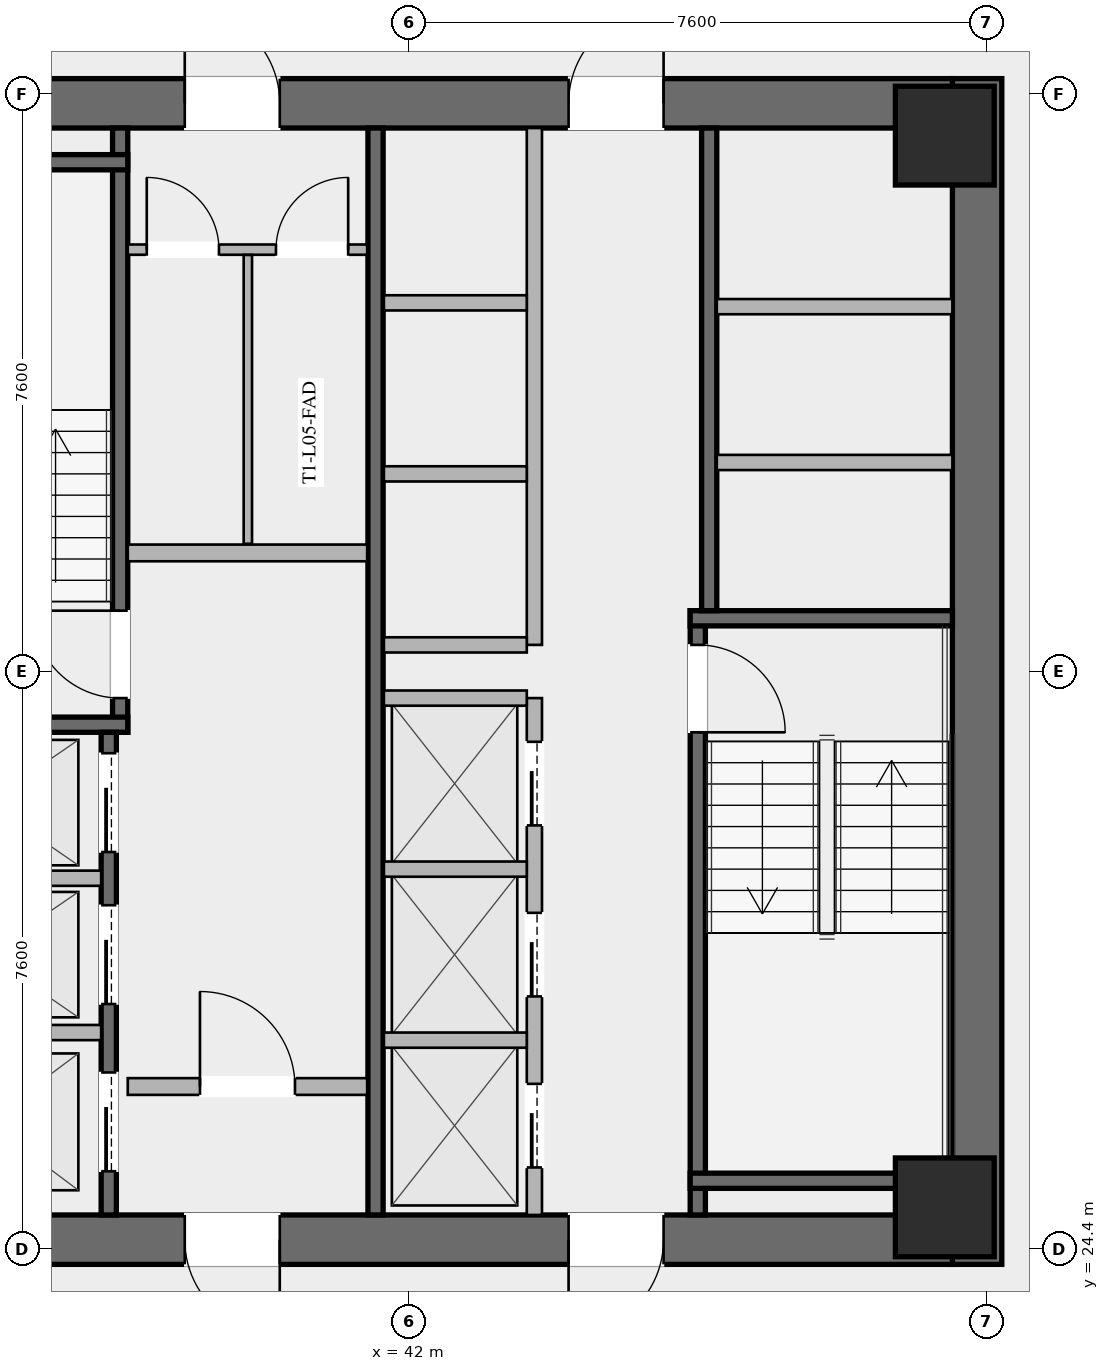
"""IFC4 building model, lengths in metres.
Left out: names, types, materials, properties, quantities, classifications, styles, units other than length and angle.
Written with IfcOpenShell. Run it as: python <this file> out.ifc"""

import sys

from ifc_helpers import new_model, si_unit, direction, frame, frame_2d, origin, origin_2d, place, context, subcontext, project, spatial, rectangle, hollow_rectangle, extrude, element, fill, save


model = new_model("IFC4")
c1 = context("Model", 3, precision=1e-05, world=origin(), true_north=direction((0.0, 1.0)))
c2 = subcontext(c1, "Body", "Model", "MODEL_VIEW")
j1 = project(units=[si_unit("LENGTHUNIT", "METRE"), si_unit("PLANEANGLEUNIT", "RADIAN")], contexts=[c1])
p1 = place(None, origin())
s1 = spatial("IfcSite", under=j1, at=p1, CompositionType="ELEMENT")
p2 = place(p1, origin())
s2 = spatial("IfcBuilding", under=s1, at=p2, CompositionType="ELEMENT")
p3 = place(p2, frame((0.0, 0.0, 24.6)))
s3 = spatial("IfcBuildingStorey", under=s2, at=p3, CompositionType="ELEMENT", Elevation=24.6)
p4 = place(p3, frame((49.475, 39.8, 0.0), z_axis=(0.0, 0.0, 1.0), x_axis=(0.0, -1.0, 0.0)))
e1 = element("IfcWall", 1, at=p4, inside=s3, PredefinedType="SHEAR", context=c2, shape_type="SweptSolid", body=[
    extrude(rectangle(XDim=15.6, YDim=0.65, at=frame_2d((7.8, 0.0))), origin(), (0.0, 0.0, 1.0), 3.55),
])
p5 = place(p3, frame((49.15, 24.525, 0.0), z_axis=(0.0, 0.0, 1.0), x_axis=(-1.0, 0.0, 0.0)))
e2 = element("IfcWall", 2, at=p5, inside=s3, PredefinedType="SHEAR", context=c2, shape_type="SweptSolid", body=[
    extrude(rectangle(XDim=14.3, YDim=0.65, at=frame_2d((7.15, 0.0))), origin(), (0.0, 0.0, 1.0), 3.55),
])
p6 = place(p5, frame((8.85, 0.0, 0.0)))
e3 = element("IfcOpeningElement", 3, at=p6, cuts=e2, PredefinedType="OPENING", context=c2, shape_type="SweptSolid", body=[
    extrude(rectangle(XDim=1.25, YDim=2.25, at=frame_2d((0.625, 1.125))), frame((0.0, 0.335, 0.0), z_axis=(0.0, -1.0, 0.0), x_axis=(1.0, 0.0, 0.0)), (0.0, 0.0, 1.0), 0.67),
])
p7 = place(p5, frame((3.8, 0.0, 0.0)))
e4 = element("IfcOpeningElement", 4, at=p7, cuts=e2, PredefinedType="OPENING", context=c2, shape_type="SweptSolid", body=[
    extrude(rectangle(XDim=1.25, YDim=2.25, at=frame_2d((0.625, 1.125))), frame((0.0, 0.335, 0.0), z_axis=(0.0, -1.0, 0.0), x_axis=(1.0, 0.0, 0.0)), (0.0, 0.0, 1.0), 0.67),
])
p8 = place(p3, frame((34.85, 39.475, 0.0), z_axis=(0.0, 0.0, 1.0), x_axis=(1.0, 0.0, 0.0)))
e5 = element("IfcWall", 5, at=p8, inside=s3, PredefinedType="SHEAR", context=c2, shape_type="SweptSolid", body=[
    extrude(rectangle(XDim=14.3, YDim=0.65, at=frame_2d((7.15, 0.0))), origin(), (0.0, 0.0, 1.0), 3.55),
])
p9 = place(p8, frame((4.2, 0.0, 0.0)))
e6 = element("IfcOpeningElement", 6, at=p9, cuts=e5, PredefinedType="OPENING", context=c2, shape_type="SweptSolid", body=[
    extrude(rectangle(XDim=1.25, YDim=2.25, at=frame_2d((0.625, 1.125))), frame((0.0, 0.335, 0.0), z_axis=(0.0, -1.0, 0.0), x_axis=(1.0, 0.0, 0.0)), (0.0, 0.0, 1.0), 0.67),
])
p10 = place(p8, frame((9.25, 0.0, 0.0)))
e7 = element("IfcOpeningElement", 7, at=p10, cuts=e5, PredefinedType="OPENING", context=c2, shape_type="SweptSolid", body=[
    extrude(rectangle(XDim=1.25, YDim=2.25, at=frame_2d((0.625, 1.125))), frame((0.0, 0.335, 0.0), z_axis=(0.0, -1.0, 0.0), x_axis=(1.0, 0.0, 0.0)), (0.0, 0.0, 1.0), 0.67),
])
for number, where, z_axis, x_axis in (
    (8, (49.05, 24.95, 0.0), (0.0, 0.0, 1.0), (1.0, 0.0, 0.0)),
    (9, (49.05, 39.05, 0.0), (0.0, 0.0, 1.0), (1.0, 0.0, 0.0)),
):
    element("IfcColumn", number, at=place(p3, frame(where, z_axis=z_axis, x_axis=x_axis)), inside=s3, PredefinedType="COLUMN", context=c2, shape_type="SweptSolid", body=[
        extrude(hollow_rectangle(XDim=1.3, YDim=1.3, WallThickness=0.05, at=origin_2d()), origin(), (0.0, 0.0, 1.0), 3.35),
    ])
p11 = place(p3, frame((38.2, 31.2, 0.0), z_axis=(0.0, 0.0, 1.0), x_axis=(0.0, 1.0, 0.0)))
e10 = element("IfcWall", 10, at=p11, inside=s3, PredefinedType="SHEAR", context=c2, shape_type="SweptSolid", body=[
    extrude(rectangle(XDim=7.95, YDim=0.2, at=frame_2d((3.975, 0.0))), origin(), (0.0, 0.0, 1.0), 3.35),
])
p12 = place(p11, frame((0.45, 0.0, 0.0)))
e11 = element("IfcOpeningElement", 11, at=p12, cuts=e10, PredefinedType="OPENING", context=c2, shape_type="SweptSolid", body=[
    extrude(rectangle(XDim=1.15, YDim=2.2, at=frame_2d((0.575, 1.1))), frame((0.0, 0.11, 0.0), z_axis=(0.0, -1.0, 0.0), x_axis=(1.0, 0.0, 0.0)), (0.0, 0.0, 1.0), 0.22),
])
for number, where, z_axis, x_axis in (
    (12, (34.85, 31.3, 0.0), (0.0, 0.0, 1.0), (1.0, 0.0, 0.0)),
    (13, (34.85, 38.7, 0.0), (0.0, 0.0, 1.0), (1.0, 0.0, 0.0)),
):
    element("IfcWall", number, at=place(p3, frame(where, z_axis=z_axis, x_axis=x_axis)), inside=s3, PredefinedType="SHEAR", context=c2, shape_type="SweptSolid", body=[
        extrude(rectangle(XDim=3.45, YDim=0.2, at=frame_2d((1.725, 0.0))), origin(), (0.0, 0.0, 1.0), 3.35),
    ])
p13 = place(p3, frame((45.8, 32.8, 0.0), z_axis=(0.0, 0.0, 1.0), x_axis=(0.0, -1.0, 0.0)))
e14 = element("IfcWall", 14, at=p13, inside=s3, PredefinedType="SHEAR", context=c2, shape_type="SweptSolid", body=[
    extrude(rectangle(XDim=7.95, YDim=0.2, at=frame_2d((3.975, 0.0))), origin(), (0.0, 0.0, 1.0), 3.35),
])
p14 = place(p13, frame((0.45, 0.0, 0.0)))
e15 = element("IfcOpeningElement", 15, at=p14, cuts=e14, PredefinedType="OPENING", context=c2, shape_type="SweptSolid", body=[
    extrude(rectangle(XDim=1.15, YDim=2.2, at=frame_2d((0.575, 1.1))), frame((0.0, 0.11, 0.0), z_axis=(0.0, -1.0, 0.0), x_axis=(1.0, 0.0, 0.0)), (0.0, 0.0, 1.0), 0.22),
])
for number, where, z_axis, x_axis in (
    (16, (45.7, 32.7, 0.0), (0.0, 0.0, 1.0), (1.0, 0.0, 0.0)),
    (17, (45.7, 25.3, 0.0), (0.0, 0.0, 1.0), (1.0, 0.0, 0.0)),
):
    element("IfcWall", number, at=place(p3, frame(where, z_axis=z_axis, x_axis=x_axis)), inside=s3, PredefinedType="SHEAR", context=c2, shape_type="SweptSolid", body=[
        extrude(rectangle(XDim=3.45, YDim=0.2, at=frame_2d((1.725, 0.0))), origin(), (0.0, 0.0, 1.0), 3.35),
    ])
p15 = place(p3, frame((41.56, 24.85, 0.0), z_axis=(0.0, 0.0, 1.0), x_axis=(0.0, 1.0, 0.0)))
e18 = element("IfcWall", 18, at=p15, inside=s3, PredefinedType="SHEAR", context=c2, shape_type="SweptSolid", body=[
    extrude(rectangle(XDim=14.3, YDim=0.2, at=frame_2d((7.15, 0.0))), origin(), (0.0, 0.0, 1.0), 3.35),
])
p16 = place(p3, frame((38.3, 33.56, 0.0), z_axis=(0.0, 0.0, 1.0), x_axis=(1.0, 0.0, 0.0)))
e19 = element("IfcWall", 19, at=p16, inside=s3, PredefinedType="SOLIDWALL", context=c2, shape_type="SweptSolid", body=[
    extrude(rectangle(XDim=3.15, YDim=0.22, at=frame_2d((1.575, 0.0))), origin(), (0.0, 0.0, 1.0), 2.703),
])
p17 = place(p3, frame((38.3, 26.54, 0.0), z_axis=(0.0, 0.0, 1.0), x_axis=(1.0, 0.0, 0.0)))
e20 = element("IfcWall", 20, at=p17, inside=s3, PredefinedType="SOLIDWALL", context=c2, shape_type="SweptSolid", body=[
    extrude(rectangle(XDim=3.15, YDim=0.22, at=frame_2d((1.575, 0.0))), origin(), (0.0, 0.0, 1.0), 2.703),
])
p18 = place(p17, frame((0.95, 0.0, 0.0)))
e21 = element("IfcOpeningElement", 21, at=p18, cuts=e20, PredefinedType="OPENING", context=c2, shape_type="SweptSolid", body=[
    extrude(rectangle(XDim=1.25, YDim=2.25, at=frame_2d((0.625, 1.125))), frame((0.0, 0.12, 0.0), z_axis=(0.0, -1.0, 0.0), x_axis=(1.0, 0.0, 0.0)), (0.0, 0.0, 1.0), 0.24),
])
p19 = place(p3, frame((38.05, 24.85, 0.0), z_axis=(0.0, 0.0, 1.0), x_axis=(0.0, 1.0, 0.0)))
e22 = element("IfcWall", 22, at=p19, inside=s3, PredefinedType="SHEAR", context=c2, shape_type="SweptSolid", body=[
    extrude(rectangle(XDim=6.35, YDim=0.2, at=frame_2d((3.175, 0.0))), origin(), (0.0, 0.0, 1.0), 3.35),
])
p20 = place(p19, frame((4.775, 0.0, 0.0)))
e23 = element("IfcOpeningElement", 23, at=p20, cuts=e22, PredefinedType="OPENING", context=c2, shape_type="SweptSolid", body=[
    extrude(rectangle(XDim=1.3, YDim=2.25, at=frame_2d((0.65, 1.125))), frame((0.0, 0.11, 0.0), z_axis=(0.0, -1.0, 0.0), x_axis=(1.0, 0.0, 0.0)), (0.0, 0.0, 1.0), 0.22),
])
p21 = place(p19, frame((2.775, 0.0, 0.0)))
e24 = element("IfcOpeningElement", 24, at=p21, cuts=e22, PredefinedType="OPENING", context=c2, shape_type="SweptSolid", body=[
    extrude(rectangle(XDim=1.3, YDim=2.25, at=frame_2d((0.65, 1.125))), frame((0.0, 0.11, 0.0), z_axis=(0.0, -1.0, 0.0), x_axis=(1.0, 0.0, 0.0)), (0.0, 0.0, 1.0), 0.22),
])
p22 = place(p19, frame((0.575, 0.0, 0.0)))
e25 = element("IfcOpeningElement", 25, at=p22, cuts=e22, PredefinedType="OPENING", context=c2, shape_type="SweptSolid", body=[
    extrude(rectangle(XDim=1.3, YDim=2.25, at=frame_2d((0.65, 1.125))), frame((0.0, 0.11, 0.0), z_axis=(0.0, -1.0, 0.0), x_axis=(1.0, 0.0, 0.0)), (0.0, 0.0, 1.0), 0.22),
])
for number, where, z_axis, x_axis in (
    (26, (34.85, 27.25, 0.0), (0.0, 0.0, 1.0), (1.0, 0.0, 0.0)),
    (27, (34.85, 29.28, 0.0), (0.0, 0.0, 1.0), (1.0, 0.0, 0.0)),
):
    element("IfcWall", number, at=place(p3, frame(where, z_axis=z_axis, x_axis=x_axis)), inside=s3, PredefinedType="SOLIDWALL", context=c2, shape_type="SweptSolid", body=[
        extrude(rectangle(XDim=3.1, YDim=0.2, at=frame_2d((1.55, 0.0))), origin(), (0.0, 0.0, 1.0), 3.35),
    ])
p23 = place(p3, frame((45.95, 39.15, 0.0), z_axis=(0.0, 0.0, 1.0), x_axis=(0.0, -1.0, 0.0)))
e28 = element("IfcWall", 28, at=p23, inside=s3, PredefinedType="SHEAR", context=c2, shape_type="SweptSolid", body=[
    extrude(rectangle(XDim=6.35, YDim=0.2, at=frame_2d((3.175, 0.0))), origin(), (0.0, 0.0, 1.0), 3.35),
])
for number, where, z_axis, x_axis in (
    (29, (46.05, 34.75, 0.0), (0.0, 0.0, 1.0), (1.0, 0.0, 0.0)),
    (30, (46.05, 36.8, 0.0), (0.0, 0.0, 1.0), (1.0, 0.0, 0.0)),
):
    element("IfcWall", number, at=place(p3, frame(where, z_axis=z_axis, x_axis=x_axis)), inside=s3, PredefinedType="SOLIDWALL", context=c2, shape_type="SweptSolid", body=[
        extrude(rectangle(XDim=3.1, YDim=0.2, at=frame_2d((1.55, 0.0))), origin(), (0.0, 0.0, 1.0), 3.35),
    ])
p24 = place(p3, frame((38.3, 37.55, 0.0), z_axis=(0.0, 0.0, 1.0), x_axis=(1.0, 0.0, 0.0)))
e31 = element("IfcWall", 31, at=p24, inside=s3, PredefinedType="PARTITIONING", context=c2, shape_type="SweptSolid", body=[
    extrude(rectangle(XDim=3.15, YDim=0.135, at=frame_2d((1.575, 0.0))), origin(), (0.0, 0.0, 1.0), 2.703),
])
p25 = place(p24, frame((0.25, 0.0, 0.0)))
e32 = element("IfcOpeningElement", 32, at=p25, cuts=e31, PredefinedType="OPENING", context=c2, shape_type="SweptSolid", body=[
    extrude(rectangle(XDim=0.95, YDim=2.05, at=frame_2d((0.475, 1.025))), frame((0.0, 0.077, 0.0), z_axis=(0.0, -1.0, 0.0), x_axis=(1.0, 0.0, 0.0)), (0.0, 0.0, 1.0), 0.155),
])
p26 = place(p24, frame((1.95, 0.0, 0.0)))
e33 = element("IfcOpeningElement", 33, at=p26, cuts=e31, PredefinedType="OPENING", context=c2, shape_type="SweptSolid", body=[
    extrude(rectangle(XDim=0.95, YDim=2.05, at=frame_2d((0.475, 1.025))), frame((0.0, 0.077, 0.0), z_axis=(0.0, -1.0, 0.0), x_axis=(1.0, 0.0, 0.0)), (0.0, 0.0, 1.0), 0.155),
])
p27 = place(p3, frame((39.88, 33.68, 0.0), z_axis=(0.0, 0.0, 1.0), x_axis=(0.0, 1.0, 0.0)))
e34 = element("IfcWall", 34, at=p27, inside=s3, PredefinedType="PARTITIONING", context=c2, shape_type="SweptSolid", body=[
    extrude(rectangle(XDim=3.8, YDim=0.11, at=frame_2d((1.9, 0.0))), origin(), (0.0, 0.0, 1.0), 2.703),
])
p28 = place(p3, frame((43.65, 24.85, 0.0), z_axis=(0.0, 0.0, 1.0), x_axis=(0.0, 1.0, 0.0)))
e35 = element("IfcWall", 35, at=p28, inside=s3, PredefinedType="SOLIDWALL", context=c2, shape_type="SweptSolid", body=[
    extrude(rectangle(XDim=6.8, YDim=0.2, at=frame_2d((3.4, 0.0))), origin(), (0.0, 0.0, 1.0), 3.35),
])
p29 = place(p28, frame((0.625, 0.0, 0.0)))
e36 = element("IfcOpeningElement", 36, at=p29, cuts=e35, PredefinedType="OPENING", context=c2, shape_type="SweptSolid", body=[
    extrude(rectangle(XDim=1.1, YDim=2.2, at=frame_2d((0.55, 1.1))), frame((0.0, 0.11, 0.0), z_axis=(0.0, -1.0, 0.0), x_axis=(1.0, 0.0, 0.0)), (0.0, 0.0, 1.0), 0.22),
])
p30 = place(p28, frame((2.875, 0.0, 0.0)))
e37 = element("IfcOpeningElement", 37, at=p30, cuts=e35, PredefinedType="OPENING", context=c2, shape_type="SweptSolid", body=[
    extrude(rectangle(XDim=1.1, YDim=2.2, at=frame_2d((0.55, 1.1))), frame((0.0, 0.11, 0.0), z_axis=(0.0, -1.0, 0.0), x_axis=(1.0, 0.0, 0.0)), (0.0, 0.0, 1.0), 0.22),
])
p31 = place(p28, frame((5.125, 0.0, 0.0)))
e38 = element("IfcOpeningElement", 38, at=p31, cuts=e35, PredefinedType="OPENING", context=c2, shape_type="SweptSolid", body=[
    extrude(rectangle(XDim=1.1, YDim=2.2, at=frame_2d((0.55, 1.1))), frame((0.0, 0.11, 0.0), z_axis=(0.0, -1.0, 0.0), x_axis=(1.0, 0.0, 0.0)), (0.0, 0.0, 1.0), 0.22),
])
for number, where, z_axis, x_axis in (
    (39, (41.67, 27.15, 0.0), (0.0, 0.0, 1.0), (1.0, 0.0, 0.0)),
    (40, (41.67, 29.4, 0.0), (0.0, 0.0, 1.0), (1.0, 0.0, 0.0)),
    (41, (41.67, 31.65, 0.0), (0.0, 0.0, 1.0), (1.0, 0.0, 0.0)),
):
    element("IfcWall", number, at=place(p3, frame(where, z_axis=z_axis, x_axis=x_axis)), inside=s3, PredefinedType="SOLIDWALL", context=c2, shape_type="SweptSolid", body=[
        extrude(rectangle(XDim=1.88, YDim=0.2, at=frame_2d((0.94, 0.0))), origin(), (0.0, 0.0, 1.0), 3.35),
    ])
p32 = place(p3, frame((43.65, 32.35, 0.0), z_axis=(0.0, 0.0, 1.0), x_axis=(0.0, 1.0, 0.0)))
e42 = element("IfcWall", 42, at=p32, inside=s3, PredefinedType="SOLIDWALL", context=c2, shape_type="SweptSolid", body=[
    extrude(rectangle(XDim=6.8, YDim=0.2, at=frame_2d((3.4, 0.0))), origin(), (0.0, 0.0, 1.0), 3.35),
])
for number, where, z_axis, x_axis in (
    (43, (41.67, 32.35, 0.0), (0.0, 0.0, 1.0), (1.0, 0.0, 0.0)),
    (44, (41.67, 34.6, 0.0), (0.0, 0.0, 1.0), (1.0, 0.0, 0.0)),
    (45, (41.67, 36.85, 0.0), (0.0, 0.0, 1.0), (1.0, 0.0, 0.0)),
):
    element("IfcWall", number, at=place(p3, frame(where, z_axis=z_axis, x_axis=x_axis)), inside=s3, PredefinedType="SOLIDWALL", context=c2, shape_type="SweptSolid", body=[
        extrude(rectangle(XDim=1.88, YDim=0.2, at=frame_2d((0.94, 0.0))), origin(), (0.0, 0.0, 1.0), 3.35),
    ])
p33 = place(p9, origin())
e46 = element("IfcDoor", 46, at=p33, inside=s3, OperationType="SINGLE_SWING_LEFT", PredefinedType="DOOR", context=c2, shape_type="SweptSolid", body=[
    extrude(rectangle(XDim=1.25, YDim=2.25, at=frame_2d((0.625, 1.125))), frame((0.0, 0.025, 0.0), z_axis=(0.0, -1.0, 0.0), x_axis=(1.0, 0.0, 0.0)), (0.0, 0.0, 1.0), 0.05),
])
fill(e6, e46)
p34 = place(p10, origin())
e47 = element("IfcDoor", 47, at=p34, inside=s3, OperationType="SINGLE_SWING_RIGHT", PredefinedType="DOOR", context=c2, shape_type="SweptSolid", body=[
    extrude(rectangle(XDim=1.25, YDim=2.25, at=frame_2d((0.625, 1.125))), frame((0.0, 0.025, 0.0), z_axis=(0.0, -1.0, 0.0), x_axis=(1.0, 0.0, 0.0)), (0.0, 0.0, 1.0), 0.05),
])
fill(e7, e47)
p35 = place(p6, origin())
e48 = element("IfcDoor", 48, at=p35, inside=s3, OperationType="SINGLE_SWING_LEFT", PredefinedType="DOOR", context=c2, shape_type="SweptSolid", body=[
    extrude(rectangle(XDim=1.25, YDim=2.25, at=frame_2d((0.625, 1.125))), frame((0.0, 0.025, 0.0), z_axis=(0.0, -1.0, 0.0), x_axis=(1.0, 0.0, 0.0)), (0.0, 0.0, 1.0), 0.05),
])
fill(e3, e48)
p36 = place(p7, origin())
e49 = element("IfcDoor", 49, at=p36, inside=s3, OperationType="SINGLE_SWING_RIGHT", PredefinedType="DOOR", context=c2, shape_type="SweptSolid", body=[
    extrude(rectangle(XDim=1.25, YDim=2.25, at=frame_2d((0.625, 1.125))), frame((0.0, 0.025, 0.0), z_axis=(0.0, -1.0, 0.0), x_axis=(1.0, 0.0, 0.0)), (0.0, 0.0, 1.0), 0.05),
])
fill(e4, e49)
p37 = place(p12, origin())
e50 = element("IfcDoor", 50, at=p37, inside=s3, OperationType="SINGLE_SWING_RIGHT", PredefinedType="DOOR", context=c2, shape_type="SweptSolid", body=[
    extrude(rectangle(XDim=1.15, YDim=2.2, at=frame_2d((0.575, 1.1))), frame((0.0, 0.025, 0.0), z_axis=(0.0, -1.0, 0.0), x_axis=(1.0, 0.0, 0.0)), (0.0, 0.0, 1.0), 0.05),
])
fill(e11, e50)
p38 = place(p14, origin())
e51 = element("IfcDoor", 51, at=p38, inside=s3, OperationType="SINGLE_SWING_RIGHT", PredefinedType="DOOR", context=c2, shape_type="SweptSolid", body=[
    extrude(rectangle(XDim=1.15, YDim=2.2, at=frame_2d((0.575, 1.1))), frame((0.0, 0.025, 0.0), z_axis=(0.0, -1.0, 0.0), x_axis=(1.0, 0.0, 0.0)), (0.0, 0.0, 1.0), 0.05),
])
fill(e15, e51)
p39 = place(p18, origin())
e52 = element("IfcDoor", 52, at=p39, inside=s3, OperationType="SINGLE_SWING_LEFT", PredefinedType="DOOR", context=c2, shape_type="SweptSolid", body=[
    extrude(rectangle(XDim=1.25, YDim=2.25, at=frame_2d((0.625, 1.125))), frame((0.0, 0.025, 0.0), z_axis=(0.0, -1.0, 0.0), x_axis=(1.0, 0.0, 0.0)), (0.0, 0.0, 1.0), 0.05),
])
fill(e21, e52)
p40 = place(p25, origin())
e53 = element("IfcDoor", 53, at=p40, inside=s3, OperationType="SINGLE_SWING_LEFT", PredefinedType="DOOR", context=c2, shape_type="SweptSolid", body=[
    extrude(rectangle(XDim=0.95, YDim=2.05, at=frame_2d((0.475, 1.025))), frame((0.0, 0.025, 0.0), z_axis=(0.0, -1.0, 0.0), x_axis=(1.0, 0.0, 0.0)), (0.0, 0.0, 1.0), 0.05),
])
fill(e32, e53)
p41 = place(p26, origin())
e54 = element("IfcDoor", 54, at=p41, inside=s3, OperationType="SINGLE_SWING_RIGHT", PredefinedType="DOOR", context=c2, shape_type="SweptSolid", body=[
    extrude(rectangle(XDim=0.95, YDim=2.05, at=frame_2d((0.475, 1.025))), frame((0.0, 0.025, 0.0), z_axis=(0.0, -1.0, 0.0), x_axis=(1.0, 0.0, 0.0)), (0.0, 0.0, 1.0), 0.05),
])
fill(e33, e54)
p42 = place(p20, origin())
e55 = element("IfcDoor", 55, at=p42, inside=s3, OperationType="SLIDING_TO_LEFT", PredefinedType="DOOR", context=c2, shape_type="SweptSolid", body=[
    extrude(rectangle(XDim=1.3, YDim=2.25, at=frame_2d((0.65, 1.125))), frame((0.0, 0.025, 0.0), z_axis=(0.0, -1.0, 0.0), x_axis=(1.0, 0.0, 0.0)), (0.0, 0.0, 1.0), 0.05),
])
fill(e23, e55)
p43 = place(p21, origin())
e56 = element("IfcDoor", 56, at=p43, inside=s3, OperationType="SLIDING_TO_LEFT", PredefinedType="DOOR", context=c2, shape_type="SweptSolid", body=[
    extrude(rectangle(XDim=1.3, YDim=2.25, at=frame_2d((0.65, 1.125))), frame((0.0, 0.025, 0.0), z_axis=(0.0, -1.0, 0.0), x_axis=(1.0, 0.0, 0.0)), (0.0, 0.0, 1.0), 0.05),
])
fill(e24, e56)
p44 = place(p22, origin())
e57 = element("IfcDoor", 57, at=p44, inside=s3, OperationType="SLIDING_TO_LEFT", PredefinedType="DOOR", context=c2, shape_type="SweptSolid", body=[
    extrude(rectangle(XDim=1.3, YDim=2.25, at=frame_2d((0.65, 1.125))), frame((0.0, 0.025, 0.0), z_axis=(0.0, -1.0, 0.0), x_axis=(1.0, 0.0, 0.0)), (0.0, 0.0, 1.0), 0.05),
])
fill(e25, e57)
p45 = place(p29, origin())
e58 = element("IfcDoor", 58, at=p45, inside=s3, OperationType="SLIDING_TO_LEFT", PredefinedType="DOOR", context=c2, shape_type="SweptSolid", body=[
    extrude(rectangle(XDim=1.1, YDim=2.2, at=frame_2d((0.55, 1.1))), frame((0.0, 0.025, 0.0), z_axis=(0.0, -1.0, 0.0), x_axis=(1.0, 0.0, 0.0)), (0.0, 0.0, 1.0), 0.05),
])
fill(e36, e58)
p46 = place(p30, origin())
e59 = element("IfcDoor", 59, at=p46, inside=s3, OperationType="SLIDING_TO_LEFT", PredefinedType="DOOR", context=c2, shape_type="SweptSolid", body=[
    extrude(rectangle(XDim=1.1, YDim=2.2, at=frame_2d((0.55, 1.1))), frame((0.0, 0.025, 0.0), z_axis=(0.0, -1.0, 0.0), x_axis=(1.0, 0.0, 0.0)), (0.0, 0.0, 1.0), 0.05),
])
fill(e37, e59)
p47 = place(p31, origin())
e60 = element("IfcDoor", 60, at=p47, inside=s3, OperationType="SLIDING_TO_LEFT", PredefinedType="DOOR", context=c2, shape_type="SweptSolid", body=[
    extrude(rectangle(XDim=1.1, YDim=2.2, at=frame_2d((0.55, 1.1))), frame((0.0, 0.025, 0.0), z_axis=(0.0, -1.0, 0.0), x_axis=(1.0, 0.0, 0.0)), (0.0, 0.0, 1.0), 0.05),
])
fill(e38, e60)
save(model, sys.argv[1])
